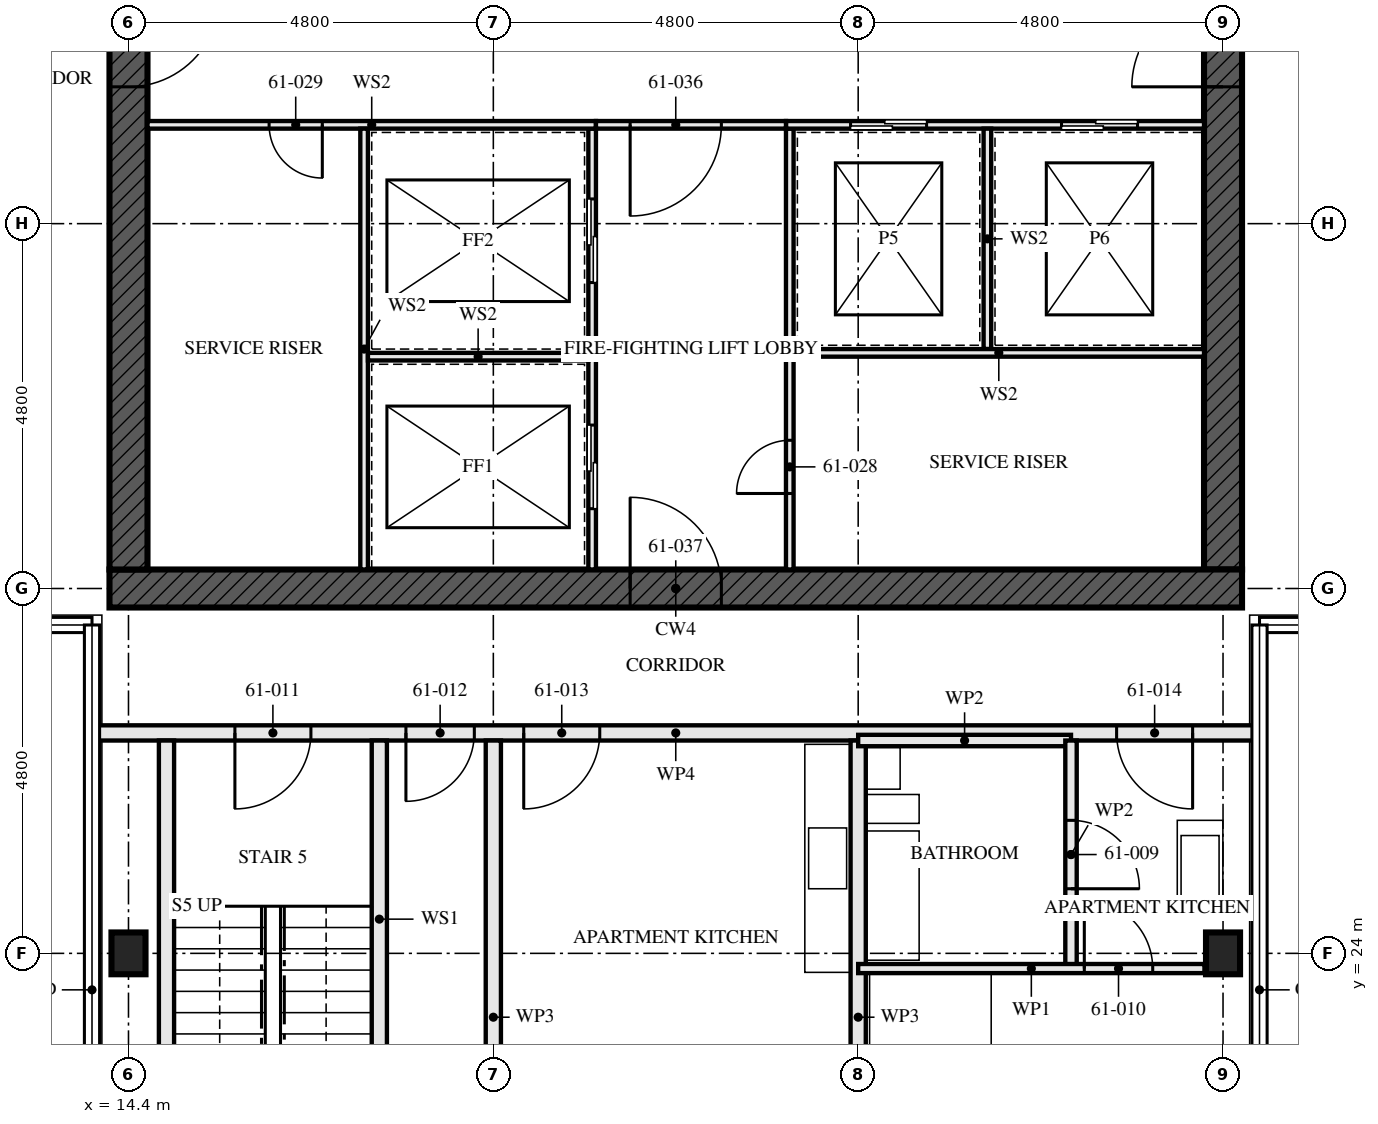
"""IFC4 building model, lengths in metres.
Left out: names, types, materials, properties, quantities, classifications, styles, units other than length and angle.
Written with IfcOpenShell. Run it as: python <this file> out.ifc"""

import sys

from ifc_helpers import new_model, si_unit, direction, frame, frame_2d, origin, origin_2d, place, context, subcontext, project, spatial, rectangle, i_section, extrude, element, fill, save


model = new_model("IFC4")
c1 = context("Model", 3, precision=1e-05, world=origin(), true_north=direction((0.0, 1.0)))
c2 = subcontext(c1, "Body", "Model", "MODEL_VIEW")
j1 = project(units=[si_unit("LENGTHUNIT", "METRE"), si_unit("PLANEANGLEUNIT", "RADIAN")], contexts=[c1])
p1 = place(None, origin())
s1 = spatial("IfcSite", under=j1, at=p1, CompositionType="ELEMENT")
p2 = place(p1, origin())
s2 = spatial("IfcBuilding", under=s1, at=p2, CompositionType="ELEMENT")
p3 = place(p2, frame((0.0, 0.0, 222.5)))
s3 = spatial("IfcBuildingStorey", under=s2, at=p3, CompositionType="ELEMENT", Elevation=222.5)
for number, where, z_axis, x_axis in (
    (1, (14.4, 24.0, 0.0), (0.0, 0.0, 1.0), (1.0, 0.0, 0.0)),
    (2, (28.8, 24.0, 0.0), (0.0, 0.0, 1.0), (1.0, 0.0, 0.0)),
):
    element("IfcColumn", number, at=place(p3, frame(where, z_axis=z_axis, x_axis=x_axis)), inside=s3, PredefinedType="COLUMN", context=c2, shape_type="SweptSolid", body=[
        extrude(i_section(OverallWidth=0.448, OverallDepth=0.55, WebThickness=0.072, FlangeThickness=0.115, FilletRadius=0.015, at=origin_2d()), origin(), (0.0, 0.0, 1.0), 3.5),
    ])
p4 = place(p3, frame((14.15, 28.8, -0.17), z_axis=(0.0, 0.0, 1.0), x_axis=(1.0, 0.0, 0.0)))
e3 = element("IfcWall", 3, at=p4, inside=s3, PredefinedType="SHEAR", context=c2, shape_type="SweptSolid", body=[
    extrude(rectangle(XDim=14.9, YDim=0.5, at=frame_2d((7.45, 0.0))), origin(), (0.0, 0.0, 1.0), 3.5),
])
p5 = place(p4, frame((6.85, 0.0, 0.17)))
e4 = element("IfcOpeningElement", 4, at=p5, cuts=e3, PredefinedType="OPENING", context=c2, shape_type="SweptSolid", body=[
    extrude(rectangle(XDim=1.2, YDim=2.1, at=frame_2d((0.6, 1.05))), frame((0.0, 0.26, 0.0), z_axis=(0.0, -1.0, 0.0), x_axis=(1.0, 0.0, 0.0)), (0.0, 0.0, 1.0), 0.521),
])
p6 = place(p3, frame((14.4, 42.95, -0.17), z_axis=(0.0, 0.0, 1.0), x_axis=(0.0, -1.0, 0.0)))
e5 = element("IfcWall", 5, at=p6, inside=s3, PredefinedType="SHEAR", context=c2, shape_type="SweptSolid", body=[
    extrude(rectangle(XDim=13.9, YDim=0.5, at=frame_2d((6.95, 0.0))), origin(), (0.0, 0.0, 1.0), 3.5),
])
p7 = place(p6, frame((6.35, 0.0, 0.17)))
e6 = element("IfcOpeningElement", 6, at=p7, cuts=e5, PredefinedType="OPENING", context=c2, shape_type="SweptSolid", body=[
    extrude(rectangle(XDim=1.2, YDim=2.1, at=frame_2d((0.6, 1.05))), frame((0.0, 0.26, 0.0), z_axis=(0.0, -1.0, 0.0), x_axis=(1.0, 0.0, 0.0)), (0.0, 0.0, 1.0), 0.521),
])
p8 = place(p3, frame((28.8, 29.05, -0.17), z_axis=(0.0, 0.0, 1.0), x_axis=(0.0, 1.0, 0.0)))
e7 = element("IfcWall", 7, at=p8, inside=s3, PredefinedType="SHEAR", context=c2, shape_type="SweptSolid", body=[
    extrude(rectangle(XDim=13.9, YDim=0.5, at=frame_2d((6.95, 0.0))), origin(), (0.0, 0.0, 1.0), 3.5),
])
p9 = place(p8, frame((6.35, 0.0, 0.17)))
e8 = element("IfcOpeningElement", 8, at=p9, cuts=e7, PredefinedType="OPENING", context=c2, shape_type="SweptSolid", body=[
    extrude(rectangle(XDim=1.2, YDim=2.1, at=frame_2d((0.6, 1.05))), frame((0.0, 0.26, 0.0), z_axis=(0.0, -1.0, 0.0), x_axis=(1.0, 0.0, 0.0)), (0.0, 0.0, 1.0), 0.521),
])
for number, where, z_axis, x_axis in (
    (9, (14.9, 22.1, 0.0), (0.0, 0.0, 1.0), (0.0, 1.0, 0.0)),
    (10, (17.7, 22.1, 0.0), (0.0, 0.0, 1.0), (0.0, 1.0, 0.0)),
):
    element("IfcWall", number, at=place(p3, frame(where, z_axis=z_axis, x_axis=x_axis)), inside=s3, PredefinedType="SOLIDWALL", context=c2, shape_type="SweptSolid", body=[
        extrude(rectangle(XDim=4.7, YDim=0.2, at=frame_2d((2.35, 0.0))), origin(), (0.0, 0.0, 1.0), 2.99),
    ])
for number, where, z_axis, x_axis in (
    (11, (19.2, 19.52, 0.0), (0.0, 0.0, 1.0), (0.0, 1.0, 0.0)),
    (12, (24.0, 19.52, 0.0), (0.0, 0.0, 1.0), (0.0, 1.0, 0.0)),
):
    element("IfcWall", number, at=place(p3, frame(where, z_axis=z_axis, x_axis=x_axis)), inside=s3, PredefinedType="PARTITIONING", context=c2, shape_type="SweptSolid", body=[
        extrude(rectangle(XDim=7.28, YDim=0.2, at=frame_2d((3.64, 0.0))), origin(), (0.0, 0.0, 1.0), 2.55),
    ])
p10 = place(p3, frame((26.8, 23.8, 0.0), z_axis=(0.0, 0.0, 1.0), x_axis=(0.0, 1.0, 0.0)))
e13 = element("IfcWall", 13, at=p10, inside=s3, PredefinedType="PARTITIONING", context=c2, shape_type="SweptSolid", body=[
    extrude(rectangle(XDim=3.0, YDim=0.15, at=frame_2d((1.5, 0.0))), origin(), (0.0, 0.0, 1.0), 2.55),
])
p11 = place(p10, frame((1.05, 0.0, 0.0)))
e14 = element("IfcOpeningElement", 14, at=p11, cuts=e13, PredefinedType="OPENING", context=c2, shape_type="SweptSolid", body=[
    extrude(rectangle(XDim=0.9, YDim=2.1, at=frame_2d((0.45, 1.05))), frame((0.0, 0.085, 0.0), z_axis=(0.0, -1.0, 0.0), x_axis=(1.0, 0.0, 0.0)), (0.0, 0.0, 1.0), 0.171),
])
p12 = place(p3, frame((24.0, 26.8, 0.0), z_axis=(0.0, 0.0, 1.0), x_axis=(1.0, 0.0, 0.0)))
e15 = element("IfcWall", 15, at=p12, inside=s3, PredefinedType="PARTITIONING", context=c2, shape_type="SweptSolid", body=[
    extrude(rectangle(XDim=2.8, YDim=0.15, at=frame_2d((1.4, 0.0))), origin(), (0.0, 0.0, 1.0), 3.33),
])
p13 = place(p3, frame((24.0, 23.8, 0.0), z_axis=(0.0, 0.0, 1.0), x_axis=(1.0, 0.0, 0.0)))
e16 = element("IfcWall", 16, at=p13, inside=s3, PredefinedType="PARTITIONING", context=c2, shape_type="SweptSolid", body=[
    extrude(rectangle(XDim=4.556, YDim=0.12, at=frame_2d((2.278, 0.0))), origin(), (0.0, 0.0, 1.0), 3.33),
])
p14 = place(p13, frame((2.975, 0.0, 0.0)))
e17 = element("IfcOpeningElement", 17, at=p14, cuts=e16, PredefinedType="OPENING", context=c2, shape_type="SweptSolid", body=[
    extrude(rectangle(XDim=0.9, YDim=2.1, at=frame_2d((0.45, 1.05))), frame((0.0, 0.071, 0.0), z_axis=(0.0, -1.0, 0.0), x_axis=(1.0, 0.0, 0.0)), (0.0, 0.0, 1.0), 0.141),
])
p15 = place(p3, frame((13.945, 26.9, 0.0), z_axis=(0.0, 0.0, 1.0), x_axis=(1.0, 0.0, 0.0)))
e18 = element("IfcWall", 18, at=p15, inside=s3, PredefinedType="PARTITIONING", context=c2, shape_type="SweptSolid", body=[
    extrude(rectangle(XDim=15.31, YDim=0.2, at=frame_2d((7.655, 0.0))), origin(), (0.0, 0.0, 1.0), 2.32),
])
p16 = place(p15, frame((1.855, 0.0, 0.0)))
e19 = element("IfcOpeningElement", 19, at=p16, cuts=e18, PredefinedType="OPENING", context=c2, shape_type="SweptSolid", body=[
    extrude(rectangle(XDim=1.0, YDim=2.1, at=frame_2d((0.5, 1.05))), frame((0.0, 0.111, 0.0), z_axis=(0.0, -1.0, 0.0), x_axis=(1.0, 0.0, 0.0)), (0.0, 0.0, 1.0), 0.221),
])
p17 = place(p15, frame((4.105, 0.0, 0.0)))
e20 = element("IfcOpeningElement", 20, at=p17, cuts=e18, PredefinedType="OPENING", context=c2, shape_type="SweptSolid", body=[
    extrude(rectangle(XDim=0.9, YDim=2.1, at=frame_2d((0.45, 1.05))), frame((0.0, 0.111, 0.0), z_axis=(0.0, -1.0, 0.0), x_axis=(1.0, 0.0, 0.0)), (0.0, 0.0, 1.0), 0.221),
])
p18 = place(p15, frame((5.655, 0.0, 0.0)))
e21 = element("IfcOpeningElement", 21, at=p18, cuts=e18, PredefinedType="OPENING", context=c2, shape_type="SweptSolid", body=[
    extrude(rectangle(XDim=1.0, YDim=2.1, at=frame_2d((0.5, 1.05))), frame((0.0, 0.111, 0.0), z_axis=(0.0, -1.0, 0.0), x_axis=(1.0, 0.0, 0.0)), (0.0, 0.0, 1.0), 0.221),
])
p19 = place(p15, frame((13.455, 0.0, 0.0)))
e22 = element("IfcOpeningElement", 22, at=p19, cuts=e18, PredefinedType="OPENING", context=c2, shape_type="SweptSolid", body=[
    extrude(rectangle(XDim=1.0, YDim=2.1, at=frame_2d((0.5, 1.05))), frame((0.0, 0.111, 0.0), z_axis=(0.0, -1.0, 0.0), x_axis=(1.0, 0.0, 0.0)), (0.0, 0.0, 1.0), 0.221),
])
p20 = place(p3, frame((20.5, 29.05, 0.0), z_axis=(0.0, 0.0, 1.0), x_axis=(0.0, 1.0, 0.0)))
e23 = element("IfcWall", 23, at=p20, inside=s3, PredefinedType="SOLIDWALL", context=c2, shape_type="SweptSolid", body=[
    extrude(rectangle(XDim=5.8, YDim=0.1, at=frame_2d((2.9, 0.0))), origin(), (0.0, 0.0, 1.0), 3.33),
])
p21 = place(p20, frame((0.8, 0.0, 0.0)))
e24 = element("IfcOpeningElement", 24, at=p21, cuts=e23, PredefinedType="OPENING", context=c2, shape_type="SweptSolid", body=[
    extrude(rectangle(XDim=1.1, YDim=2.3, at=frame_2d((0.55, 1.15))), frame((0.0, 0.061, 0.0), z_axis=(0.0, -1.0, 0.0), x_axis=(1.0, 0.0, 0.0)), (0.0, 0.0, 1.0), 0.121),
])
p22 = place(p20, frame((3.775, 0.0, 0.0)))
e25 = element("IfcOpeningElement", 25, at=p22, cuts=e23, PredefinedType="OPENING", context=c2, shape_type="SweptSolid", body=[
    extrude(rectangle(XDim=1.1, YDim=2.3, at=frame_2d((0.55, 1.15))), frame((0.0, 0.061, 0.0), z_axis=(0.0, -1.0, 0.0), x_axis=(1.0, 0.0, 0.0)), (0.0, 0.0, 1.0), 0.121),
])
p23 = place(p3, frame((23.1, 29.05, 0.0), z_axis=(0.0, 0.0, 1.0), x_axis=(0.0, 1.0, 0.0)))
e26 = element("IfcWall", 26, at=p23, inside=s3, PredefinedType="SOLIDWALL", context=c2, shape_type="SweptSolid", body=[
    extrude(rectangle(XDim=5.8, YDim=0.1, at=frame_2d((2.9, 0.0))), origin(), (0.0, 0.0, 1.0), 3.33),
])
p24 = place(p23, frame((1.0, 0.0, 0.0)))
e27 = element("IfcOpeningElement", 27, at=p24, cuts=e26, PredefinedType="OPENING", context=c2, shape_type="SweptSolid", body=[
    extrude(rectangle(XDim=0.7, YDim=2.1, at=frame_2d((0.35, 1.05))), frame((0.0, 0.061, 0.0), z_axis=(0.0, -1.0, 0.0), x_axis=(1.0, 0.0, 0.0)), (0.0, 0.0, 1.0), 0.121),
])
p25 = place(p3, frame((14.65, 34.9, 0.0), z_axis=(0.0, 0.0, 1.0), x_axis=(1.0, 0.0, 0.0)))
e28 = element("IfcWall", 28, at=p25, inside=s3, PredefinedType="SOLIDWALL", context=c2, shape_type="SweptSolid", body=[
    extrude(rectangle(XDim=5.9, YDim=0.1, at=frame_2d((2.95, 0.0))), origin(), (0.0, 0.0, 1.0), 3.33),
])
p26 = place(p25, frame((1.6, 0.0, 0.0)))
e29 = element("IfcOpeningElement", 29, at=p26, cuts=e28, PredefinedType="OPENING", context=c2, shape_type="SweptSolid", body=[
    extrude(rectangle(XDim=0.7, YDim=2.1, at=frame_2d((0.35, 1.05))), frame((0.0, 0.061, 0.0), z_axis=(0.0, -1.0, 0.0), x_axis=(1.0, 0.0, 0.0)), (0.0, 0.0, 1.0), 0.121),
])
p27 = place(p3, frame((23.05, 34.9, 0.0), z_axis=(0.0, 0.0, 1.0), x_axis=(1.0, 0.0, 0.0)))
e30 = element("IfcWall", 30, at=p27, inside=s3, PredefinedType="SOLIDWALL", context=c2, shape_type="SweptSolid", body=[
    extrude(rectangle(XDim=5.5, YDim=0.1, at=frame_2d((2.75, 0.0))), origin(), (0.0, 0.0, 1.0), 3.33),
])
p28 = place(p27, frame((0.85, 0.0, 0.0)))
e31 = element("IfcOpeningElement", 31, at=p28, cuts=e30, PredefinedType="OPENING", context=c2, shape_type="SweptSolid", body=[
    extrude(rectangle(XDim=1.0, YDim=2.1, at=frame_2d((0.5, 1.05))), frame((0.0, 0.061, 0.0), z_axis=(0.0, -1.0, 0.0), x_axis=(1.0, 0.0, 0.0)), (0.0, 0.0, 1.0), 0.121),
])
p29 = place(p27, frame((3.625, 0.0, 0.0)))
e32 = element("IfcOpeningElement", 32, at=p29, cuts=e30, PredefinedType="OPENING", context=c2, shape_type="SweptSolid", body=[
    extrude(rectangle(XDim=1.0, YDim=2.1, at=frame_2d((0.5, 1.05))), frame((0.0, 0.061, 0.0), z_axis=(0.0, -1.0, 0.0), x_axis=(1.0, 0.0, 0.0)), (0.0, 0.0, 1.0), 0.121),
])
p30 = place(p3, frame((20.55, 34.9, 0.0), z_axis=(0.0, 0.0, 1.0), x_axis=(1.0, 0.0, 0.0)))
e33 = element("IfcWall", 33, at=p30, inside=s3, PredefinedType="SOLIDWALL", context=c2, shape_type="SweptSolid", body=[
    extrude(rectangle(XDim=2.5, YDim=0.1, at=frame_2d((1.25, 0.0))), origin(), (0.0, 0.0, 1.0), 3.33),
])
p31 = place(p30, frame((0.45, 0.0, 0.0)))
e34 = element("IfcOpeningElement", 34, at=p31, cuts=e33, PredefinedType="OPENING", context=c2, shape_type="SweptSolid", body=[
    extrude(rectangle(XDim=1.2, YDim=2.1, at=frame_2d((0.6, 1.05))), frame((0.0, 0.061, 0.0), z_axis=(0.0, -1.0, 0.0), x_axis=(1.0, 0.0, 0.0)), (0.0, 0.0, 1.0), 0.121),
])
p32 = place(p3, frame((17.5, 29.05, 0.0), z_axis=(0.0, 0.0, 1.0), x_axis=(0.0, 1.0, 0.0)))
e35 = element("IfcWall", 35, at=p32, inside=s3, PredefinedType="SOLIDWALL", context=c2, shape_type="SweptSolid", body=[
    extrude(rectangle(XDim=5.8, YDim=0.1, at=frame_2d((2.9, 0.0))), origin(), (0.0, 0.0, 1.0), 3.33),
])
p33 = place(p3, frame((17.55, 31.85, 0.0), z_axis=(0.0, 0.0, 1.0), x_axis=(1.0, 0.0, 0.0)))
e36 = element("IfcWall", 36, at=p33, inside=s3, PredefinedType="SOLIDWALL", context=c2, shape_type="SweptSolid", body=[
    extrude(rectangle(XDim=2.9, YDim=0.1, at=frame_2d((1.45, 0.0))), origin(), (0.0, 0.0, 1.0), 3.33),
])
p34 = place(p3, frame((25.7, 31.95, 0.0), z_axis=(0.0, 0.0, 1.0), x_axis=(0.0, 1.0, 0.0)))
e37 = element("IfcWall", 37, at=p34, inside=s3, PredefinedType="SOLIDWALL", context=c2, shape_type="SweptSolid", body=[
    extrude(rectangle(XDim=2.9, YDim=0.1, at=frame_2d((1.45, 0.0))), origin(), (0.0, 0.0, 1.0), 3.33),
])
p35 = place(p3, frame((23.15, 31.9, 0.0), z_axis=(0.0, 0.0, 1.0), x_axis=(1.0, 0.0, 0.0)))
e38 = element("IfcWall", 38, at=p35, inside=s3, PredefinedType="SOLIDWALL", context=c2, shape_type="SweptSolid", body=[
    extrude(rectangle(XDim=5.4, YDim=0.1, at=frame_2d((2.7, 0.0))), origin(), (0.0, 0.0, 1.0), 3.33),
])
p36 = place(p11, frame((0.9, 0.0, 0.0), z_axis=(0.0, 0.0, 1.0), x_axis=(-1.0, 0.0, 0.0)))
e39 = element("IfcDoor", 39, at=p36, inside=s3, OperationType="SINGLE_SWING_LEFT", PredefinedType="DOOR", context=c2, shape_type="SweptSolid", body=[
    extrude(rectangle(XDim=0.9, YDim=2.1, at=frame_2d((0.45, 1.05))), frame((0.0, 0.022, 0.0), z_axis=(0.0, -1.0, 0.0), x_axis=(1.0, 0.0, 0.0)), (0.0, 0.0, 1.0), 0.044),
])
fill(e14, e39)
p37 = place(p14, origin())
e40 = element("IfcDoor", 40, at=p37, inside=s3, OperationType="SINGLE_SWING_RIGHT", PredefinedType="DOOR", context=c2, shape_type="SweptSolid", body=[
    extrude(rectangle(XDim=0.9, YDim=2.1, at=frame_2d((0.45, 1.05))), frame((0.0, 0.022, 0.0), z_axis=(0.0, -1.0, 0.0), x_axis=(1.0, 0.0, 0.0)), (0.0, 0.0, 1.0), 0.044),
])
fill(e17, e40)
p38 = place(p16, frame((1.0, 0.0, 0.0), z_axis=(0.0, 0.0, 1.0), x_axis=(-1.0, 0.0, 0.0)))
e41 = element("IfcDoor", 41, at=p38, inside=s3, OperationType="SINGLE_SWING_LEFT", PredefinedType="DOOR", context=c2, shape_type="SweptSolid", body=[
    extrude(rectangle(XDim=1.0, YDim=2.1, at=frame_2d((0.5, 1.05))), frame((0.0, 0.032, 0.0), z_axis=(0.0, -1.0, 0.0), x_axis=(1.0, 0.0, 0.0)), (0.0, 0.0, 1.0), 0.064),
])
fill(e19, e41)
p39 = place(p17, frame((0.9, 0.0, 0.0), z_axis=(0.0, 0.0, 1.0), x_axis=(-1.0, 0.0, 0.0)))
e42 = element("IfcDoor", 42, at=p39, inside=s3, OperationType="SINGLE_SWING_LEFT", PredefinedType="DOOR", context=c2, shape_type="SweptSolid", body=[
    extrude(rectangle(XDim=0.9, YDim=2.1, at=frame_2d((0.45, 1.05))), frame((0.0, 0.027, 0.0), z_axis=(0.0, -1.0, 0.0), x_axis=(1.0, 0.0, 0.0)), (0.0, 0.0, 1.0), 0.054),
])
fill(e20, e42)
p40 = place(p18, frame((1.0, 0.0, 0.0), z_axis=(0.0, 0.0, 1.0), x_axis=(-1.0, 0.0, 0.0)))
e43 = element("IfcDoor", 43, at=p40, inside=s3, OperationType="SINGLE_SWING_LEFT", PredefinedType="DOOR", context=c2, shape_type="SweptSolid", body=[
    extrude(rectangle(XDim=1.0, YDim=2.1, at=frame_2d((0.5, 1.05))), frame((0.0, 0.027, 0.0), z_axis=(0.0, -1.0, 0.0), x_axis=(1.0, 0.0, 0.0)), (0.0, 0.0, 1.0), 0.054),
])
fill(e21, e43)
p41 = place(p19, frame((1.0, 0.0, 0.0), z_axis=(0.0, 0.0, 1.0), x_axis=(-1.0, 0.0, 0.0)))
e44 = element("IfcDoor", 44, at=p41, inside=s3, OperationType="SINGLE_SWING_RIGHT", PredefinedType="DOOR", context=c2, shape_type="SweptSolid", body=[
    extrude(rectangle(XDim=1.0, YDim=2.1, at=frame_2d((0.5, 1.05))), frame((0.0, 0.027, 0.0), z_axis=(0.0, -1.0, 0.0), x_axis=(1.0, 0.0, 0.0)), (0.0, 0.0, 1.0), 0.054),
])
fill(e22, e44)
p42 = place(p21, origin())
e45 = element("IfcDoor", 45, at=p42, inside=s3, OperationType="SLIDING_TO_LEFT", PredefinedType="DOOR", context=c2, shape_type="SweptSolid", body=[
    extrude(rectangle(XDim=1.1, YDim=2.3, at=frame_2d((0.55, 1.15))), frame((0.0, 0.05, 0.0), z_axis=(0.0, -1.0, 0.0), x_axis=(1.0, 0.0, 0.0)), (0.0, 0.0, 1.0), 0.1),
])
fill(e24, e45)
p43 = place(p22, origin())
e46 = element("IfcDoor", 46, at=p43, inside=s3, OperationType="SLIDING_TO_LEFT", PredefinedType="DOOR", context=c2, shape_type="SweptSolid", body=[
    extrude(rectangle(XDim=1.1, YDim=2.3, at=frame_2d((0.55, 1.15))), frame((0.0, 0.05, 0.0), z_axis=(0.0, -1.0, 0.0), x_axis=(1.0, 0.0, 0.0)), (0.0, 0.0, 1.0), 0.1),
])
fill(e25, e46)
p44 = place(p24, origin())
e47 = element("IfcDoor", 47, at=p44, inside=s3, OperationType="SINGLE_SWING_RIGHT", PredefinedType="DOOR", context=c2, shape_type="SweptSolid", body=[
    extrude(rectangle(XDim=0.7, YDim=2.1, at=frame_2d((0.35, 1.05))), frame((0.0, 0.027, 0.0), z_axis=(0.0, -1.0, 0.0), x_axis=(1.0, 0.0, 0.0)), (0.0, 0.0, 1.0), 0.054),
])
fill(e27, e47)
p45 = place(p26, frame((0.7, 0.0, 0.0), z_axis=(0.0, 0.0, 1.0), x_axis=(-1.0, 0.0, 0.0)))
e48 = element("IfcDoor", 48, at=p45, inside=s3, OperationType="SINGLE_SWING_RIGHT", PredefinedType="DOOR", context=c2, shape_type="SweptSolid", body=[
    extrude(rectangle(XDim=0.7, YDim=2.1, at=frame_2d((0.35, 1.05))), frame((0.0, 0.027, 0.0), z_axis=(0.0, -1.0, 0.0), x_axis=(1.0, 0.0, 0.0)), (0.0, 0.0, 1.0), 0.054),
])
fill(e29, e48)
p46 = place(p28, origin())
e49 = element("IfcDoor", 49, at=p46, inside=s3, OperationType="SLIDING_TO_LEFT", PredefinedType="DOOR", context=c2, shape_type="SweptSolid", body=[
    extrude(rectangle(XDim=1.0, YDim=2.1, at=frame_2d((0.5, 1.05))), frame((0.0, 0.05, 0.0), z_axis=(0.0, -1.0, 0.0), x_axis=(1.0, 0.0, 0.0)), (0.0, 0.0, 1.0), 0.1),
])
fill(e31, e49)
p47 = place(p29, origin())
e50 = element("IfcDoor", 50, at=p47, inside=s3, OperationType="SLIDING_TO_LEFT", PredefinedType="DOOR", context=c2, shape_type="SweptSolid", body=[
    extrude(rectangle(XDim=1.0, YDim=2.1, at=frame_2d((0.5, 1.05))), frame((0.0, 0.05, 0.0), z_axis=(0.0, -1.0, 0.0), x_axis=(1.0, 0.0, 0.0)), (0.0, 0.0, 1.0), 0.1),
])
fill(e32, e50)
p48 = place(p31, frame((1.2, 0.0, 0.0), z_axis=(0.0, 0.0, 1.0), x_axis=(-1.0, 0.0, 0.0)))
e51 = element("IfcDoor", 51, at=p48, inside=s3, OperationType="SINGLE_SWING_LEFT", PredefinedType="DOOR", context=c2, shape_type="SweptSolid", body=[
    extrude(rectangle(XDim=1.2, YDim=2.1, at=frame_2d((0.6, 1.05))), frame((0.0, 0.027, 0.0), z_axis=(0.0, -1.0, 0.0), x_axis=(1.0, 0.0, 0.0)), (0.0, 0.0, 1.0), 0.054),
])
fill(e34, e51)
p49 = place(p5, origin())
e52 = element("IfcDoor", 52, at=p49, inside=s3, OperationType="SINGLE_SWING_LEFT", PredefinedType="DOOR", context=c2, shape_type="SweptSolid", body=[
    extrude(rectangle(XDim=1.2, YDim=2.1, at=frame_2d((0.6, 1.05))), frame((0.0, 0.027, 0.0), z_axis=(0.0, -1.0, 0.0), x_axis=(1.0, 0.0, 0.0)), (0.0, 0.0, 1.0), 0.054),
])
fill(e4, e52)
p50 = place(p7, origin())
e53 = element("IfcDoor", 53, at=p50, inside=s3, OperationType="SINGLE_SWING_LEFT", PredefinedType="DOOR", context=c2, shape_type="SweptSolid", body=[
    extrude(rectangle(XDim=1.2, YDim=2.1, at=frame_2d((0.6, 1.05))), frame((0.0, 0.027, 0.0), z_axis=(0.0, -1.0, 0.0), x_axis=(1.0, 0.0, 0.0)), (0.0, 0.0, 1.0), 0.054),
])
fill(e6, e53)
p51 = place(p9, origin())
e54 = element("IfcDoor", 54, at=p51, inside=s3, OperationType="SINGLE_SWING_LEFT", PredefinedType="DOOR", context=c2, shape_type="SweptSolid", body=[
    extrude(rectangle(XDim=1.2, YDim=2.1, at=frame_2d((0.6, 1.05))), frame((0.0, 0.027, 0.0), z_axis=(0.0, -1.0, 0.0), x_axis=(1.0, 0.0, 0.0)), (0.0, 0.0, 1.0), 0.054),
])
fill(e8, e54)
save(model, sys.argv[1])
